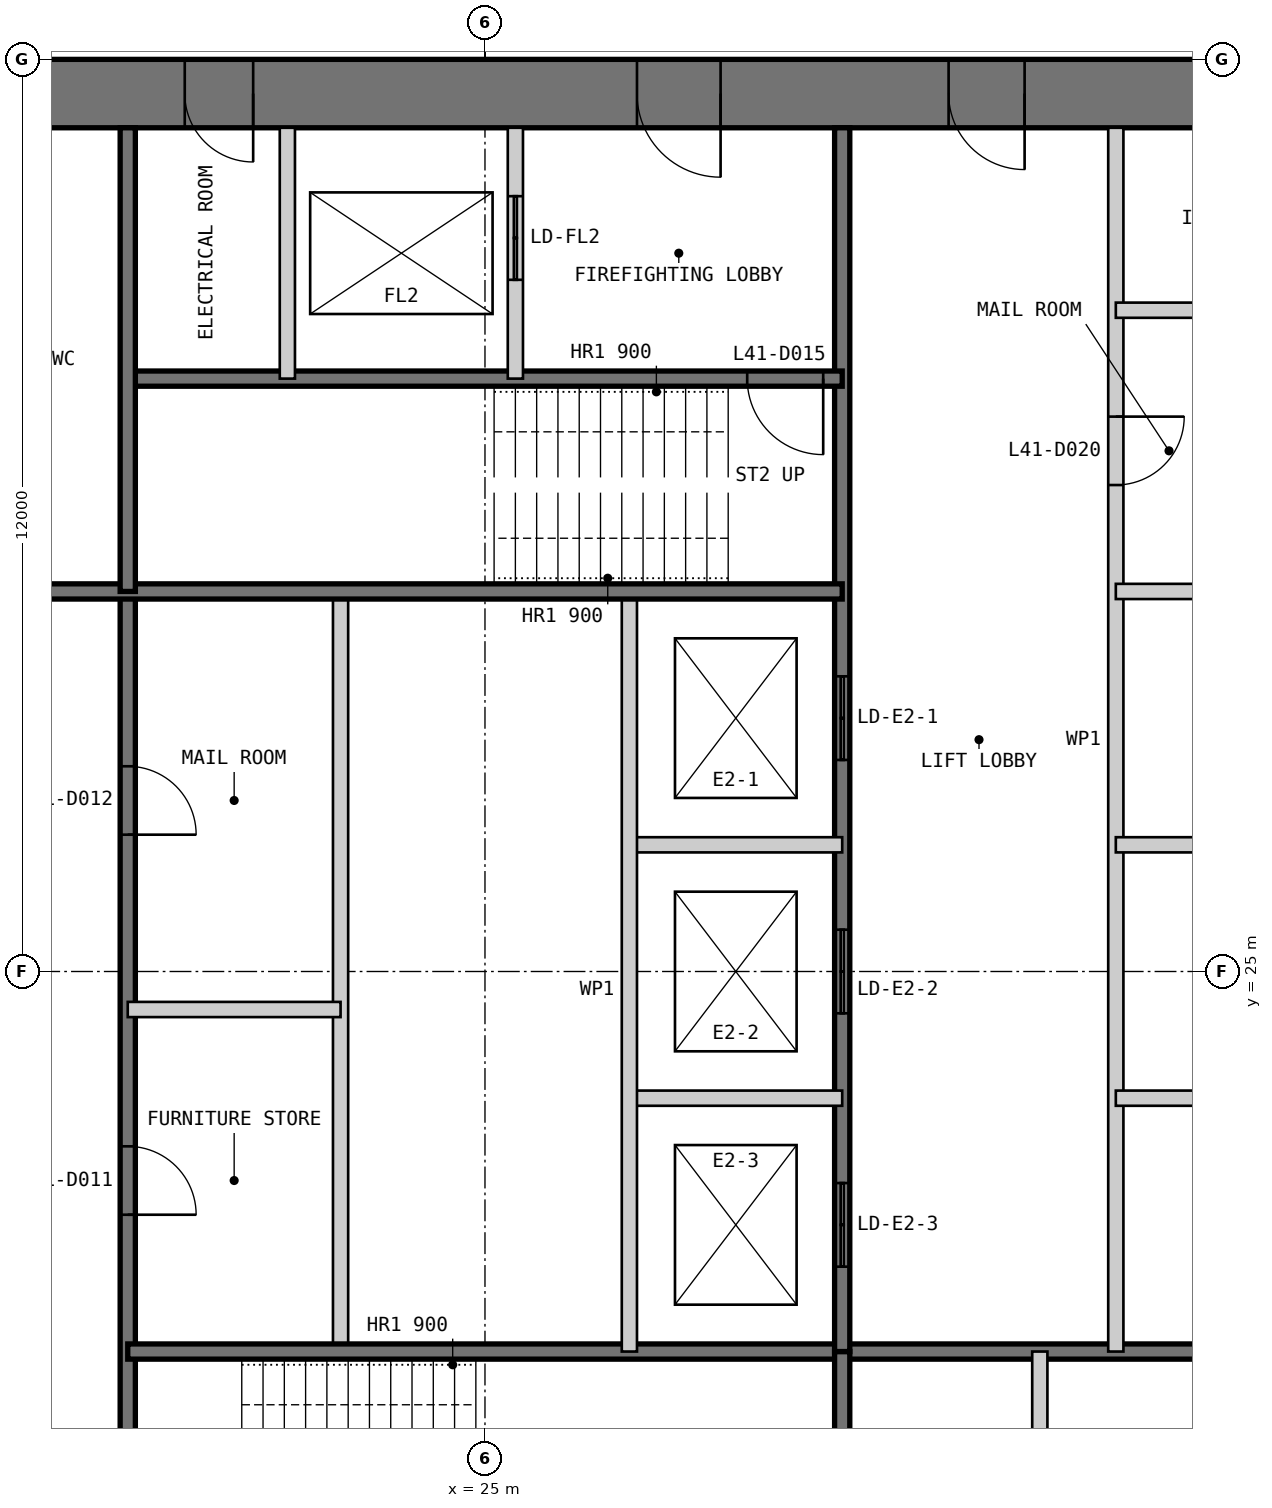
"""IFC4 building model, lengths in metres.
Left out: names, types, materials, properties, quantities, classifications, styles, units other than length and angle.
Written with IfcOpenShell. Run it as: python <this file> out.ifc"""

import sys

from ifc_helpers import new_model, si_unit, direction, frame, frame_2d, origin, place, context, subcontext, project, spatial, polyline, rectangle, outline, extrude, element, fill, save


model = new_model("IFC4")
c1 = context("Model", 3, precision=1e-05, world=origin(), true_north=direction((0.0, 1.0)))
c2 = subcontext(c1, "Body", "Model", "MODEL_VIEW")
j1 = project(units=[si_unit("LENGTHUNIT", "METRE"), si_unit("PLANEANGLEUNIT", "RADIAN")], contexts=[c1])
p1 = place(None, origin())
s1 = spatial("IfcSite", under=j1, at=p1, CompositionType="ELEMENT")
p2 = place(p1, origin())
s2 = spatial("IfcBuilding", under=s1, at=p2, CompositionType="ELEMENT")
p3 = place(p2, frame((0.0, 0.0, 177.8)))
s3 = spatial("IfcBuildingStorey", under=s2, at=p3, CompositionType="ELEMENT", Elevation=177.8)
p4 = place(p3, frame((37.0, 36.55, 0.0), z_axis=(0.0, 0.0, 1.0), x_axis=(-1.0, 0.0, 0.0)))
e1 = element("IfcWall", 1, at=p4, inside=s3, PredefinedType="SHEAR", context=c2, shape_type="SweptSolid", body=[
    extrude(outline(polyline([(0.0, -0.45), (24.0, -0.45), (23.1, 0.45), (0.9, 0.45), (0.0, -0.45)])), origin(), (0.0, 0.0, 1.0), 4.0),
])
p5 = place(p4, frame((4.9, 0.0, 0.0)))
e2 = element("IfcOpeningElement", 2, at=p5, cuts=e1, PredefinedType="OPENING", context=c2, shape_type="SweptSolid", body=[
    extrude(rectangle(XDim=1.0, YDim=2.2, at=frame_2d((0.5, 1.1))), frame((0.0, 0.46, 0.0), z_axis=(0.0, -1.0, 0.0), x_axis=(1.0, 0.0, 0.0)), (0.0, 0.0, 1.0), 0.92),
])
p6 = place(p4, frame((8.9, 0.0, 0.0)))
e3 = element("IfcOpeningElement", 3, at=p6, cuts=e1, PredefinedType="OPENING", context=c2, shape_type="SweptSolid", body=[
    extrude(rectangle(XDim=1.1, YDim=2.2, at=frame_2d((0.55, 1.1))), frame((0.0, 0.46, 0.0), z_axis=(0.0, -1.0, 0.0), x_axis=(1.0, 0.0, 0.0)), (0.0, 0.0, 1.0), 0.92),
])
p7 = place(p4, frame((15.05, 0.0, 0.0)))
e4 = element("IfcOpeningElement", 4, at=p7, cuts=e1, PredefinedType="OPENING", context=c2, shape_type="SweptSolid", body=[
    extrude(rectangle(XDim=0.9, YDim=2.2, at=frame_2d((0.45, 1.1))), frame((0.0, 0.46, 0.0), z_axis=(0.0, -1.0, 0.0), x_axis=(1.0, 0.0, 0.0)), (0.0, 0.0, 1.0), 0.92),
])
p8 = place(p4, frame((17.9, 0.0, 0.0)))
e5 = element("IfcOpeningElement", 5, at=p8, cuts=e1, PredefinedType="OPENING", context=c2, shape_type="SweptSolid", body=[
    extrude(rectangle(XDim=1.0, YDim=2.2, at=frame_2d((0.5, 1.1))), frame((0.0, 0.46, 0.0), z_axis=(0.0, -1.0, 0.0), x_axis=(1.0, 0.0, 0.0)), (0.0, 0.0, 1.0), 0.92),
])
p9 = place(p4, frame((21.4, 0.0, 0.0)))
e6 = element("IfcOpeningElement", 6, at=p9, cuts=e1, PredefinedType="OPENING", context=c2, shape_type="SweptSolid", body=[
    extrude(rectangle(XDim=1.0, YDim=2.2, at=frame_2d((0.5, 1.1))), frame((0.0, 0.46, 0.0), z_axis=(0.0, -1.0, 0.0), x_axis=(1.0, 0.0, 0.0)), (0.0, 0.0, 1.0), 0.92),
])
p10 = place(p3, frame((20.3, 13.9, 0.0), z_axis=(0.0, 0.0, 1.0), x_axis=(0.0, 1.0, 0.0)))
e7 = element("IfcWall", 7, at=p10, inside=s3, PredefinedType="SOLIDWALL", context=c2, shape_type="SweptSolid", body=[
    extrude(rectangle(XDim=16.1, YDim=0.2, at=frame_2d((8.05, 0.0))), origin(), (0.0, 0.0, 1.0), 3.8),
])
p11 = place(p10, frame((7.9, 0.0, 0.0)))
e8 = element("IfcOpeningElement", 8, at=p11, cuts=e7, PredefinedType="OPENING", context=c2, shape_type="SweptSolid", body=[
    extrude(rectangle(XDim=0.9, YDim=2.2, at=frame_2d((0.45, 1.1))), frame((0.0, 0.11, 0.0), z_axis=(0.0, -1.0, 0.0), x_axis=(1.0, 0.0, 0.0)), (0.0, 0.0, 1.0), 0.22),
])
p12 = place(p10, frame((12.9, 0.0, 0.0)))
e9 = element("IfcOpeningElement", 9, at=p12, cuts=e7, PredefinedType="OPENING", context=c2, shape_type="SweptSolid", body=[
    extrude(rectangle(XDim=0.9, YDim=2.2, at=frame_2d((0.45, 1.1))), frame((0.0, 0.11, 0.0), z_axis=(0.0, -1.0, 0.0), x_axis=(1.0, 0.0, 0.0)), (0.0, 0.0, 1.0), 0.22),
])
p13 = place(p3, frame((23.1, 20.0, 0.0), z_axis=(0.0, 0.0, 1.0), x_axis=(0.0, 1.0, 0.0)))
e10 = element("IfcWall", 10, at=p13, inside=s3, PredefinedType="PARTITIONING", context=c2, shape_type="SweptSolid", body=[
    extrude(rectangle(XDim=10.0, YDim=0.2, at=frame_2d((5.0, 0.0))), origin(), (0.0, 0.0, 1.0), 3.8),
])
p14 = place(p3, frame((20.3, 20.0, 0.0), z_axis=(0.0, 0.0, 1.0), x_axis=(1.0, 0.0, 0.0)))
e11 = element("IfcWall", 11, at=p14, inside=s3, PredefinedType="SOLIDWALL", context=c2, shape_type="SweptSolid", body=[
    extrude(rectangle(XDim=15.8, YDim=0.2, at=frame_2d((7.9, 0.0))), origin(), (0.0, 0.0, 1.0), 3.8),
])
p15 = place(p3, frame((29.7, 13.9, 0.0), z_axis=(0.0, 0.0, 1.0), x_axis=(0.0, 1.0, 0.0)))
e12 = element("IfcWall", 12, at=p15, inside=s3, PredefinedType="SOLIDWALL", context=c2, shape_type="SweptSolid", body=[
    extrude(rectangle(XDim=6.1, YDim=0.2, at=frame_2d((3.05, 0.0))), origin(), (0.0, 0.0, 1.0), 3.8),
])
p16 = place(p3, frame((32.3, 13.9, 0.0), z_axis=(0.0, 0.0, 1.0), x_axis=(0.0, 1.0, 0.0)))
e13 = element("IfcWall", 13, at=p16, inside=s3, PredefinedType="PARTITIONING", context=c2, shape_type="SweptSolid", body=[
    extrude(rectangle(XDim=6.1, YDim=0.2, at=frame_2d((3.05, 0.0))), origin(), (0.0, 0.0, 1.0), 3.8),
])
p17 = place(p3, frame((20.3, 24.5, 0.0), z_axis=(0.0, 0.0, 1.0), x_axis=(1.0, 0.0, 0.0)))
e14 = element("IfcWall", 14, at=p17, inside=s3, PredefinedType="PARTITIONING", context=c2, shape_type="SweptSolid", body=[
    extrude(rectangle(XDim=2.8, YDim=0.2, at=frame_2d((1.4, 0.0))), origin(), (0.0, 0.0, 1.0), 3.8),
])
p18 = place(p3, frame((33.3, 36.1, 0.0), z_axis=(0.0, 0.0, 1.0), x_axis=(0.0, -1.0, 0.0)))
e15 = element("IfcWall", 15, at=p18, inside=s3, PredefinedType="PARTITIONING", context=c2, shape_type="SweptSolid", body=[
    extrude(rectangle(XDim=16.1, YDim=0.2, at=frame_2d((8.05, 0.0))), origin(), (0.0, 0.0, 1.0), 3.8),
])
p19 = place(p18, frame((3.8, 0.0, 0.0)))
e16 = element("IfcOpeningElement", 16, at=p19, cuts=e15, PredefinedType="OPENING", context=c2, shape_type="SweptSolid", body=[
    extrude(rectangle(XDim=0.9, YDim=2.2, at=frame_2d((0.45, 1.1))), frame((0.0, 0.11, 0.0), z_axis=(0.0, -1.0, 0.0), x_axis=(1.0, 0.0, 0.0)), (0.0, 0.0, 1.0), 0.22),
])
p20 = place(p3, frame((29.7, 36.1, 0.0), z_axis=(0.0, 0.0, 1.0), x_axis=(0.0, -1.0, 0.0)))
e17 = element("IfcWall", 17, at=p20, inside=s3, PredefinedType="SOLIDWALL", context=c2, shape_type="SweptSolid", body=[
    extrude(rectangle(XDim=16.1, YDim=0.2, at=frame_2d((8.05, 0.0))), origin(), (0.0, 0.0, 1.0), 3.8),
])
p21 = place(p20, frame((7.217, 0.0, 0.0)))
e18 = element("IfcOpeningElement", 18, at=p21, cuts=e17, PredefinedType="OPENING", context=c2, shape_type="SweptSolid", body=[
    extrude(rectangle(XDim=1.1, YDim=2.2, at=frame_2d((0.55, 1.1))), frame((0.0, 0.11, 0.0), z_axis=(0.0, -1.0, 0.0), x_axis=(1.0, 0.0, 0.0)), (0.0, 0.0, 1.0), 0.22),
])
p22 = place(p20, frame((10.55, 0.0, 0.0)))
e19 = element("IfcOpeningElement", 19, at=p22, cuts=e17, PredefinedType="OPENING", context=c2, shape_type="SweptSolid", body=[
    extrude(rectangle(XDim=1.1, YDim=2.2, at=frame_2d((0.55, 1.1))), frame((0.0, 0.11, 0.0), z_axis=(0.0, -1.0, 0.0), x_axis=(1.0, 0.0, 0.0)), (0.0, 0.0, 1.0), 0.22),
])
p23 = place(p20, frame((13.883, 0.0, 0.0)))
e20 = element("IfcOpeningElement", 20, at=p23, cuts=e17, PredefinedType="OPENING", context=c2, shape_type="SweptSolid", body=[
    extrude(rectangle(XDim=1.1, YDim=2.2, at=frame_2d((0.55, 1.1))), frame((0.0, 0.11, 0.0), z_axis=(0.0, -1.0, 0.0), x_axis=(1.0, 0.0, 0.0)), (0.0, 0.0, 1.0), 0.22),
])
for number, where, z_axis, x_axis in (
    (21, (36.1, 30.0, 0.0), (0.0, 0.0, 1.0), (-1.0, 0.0, 0.0)),
    (22, (36.1, 26.667, 0.0), (0.0, 0.0, 1.0), (-1.0, 0.0, 0.0)),
    (23, (36.1, 23.333, 0.0), (0.0, 0.0, 1.0), (-1.0, 0.0, 0.0)),
    (24, (29.7, 26.667, 0.0), (0.0, 0.0, 1.0), (-1.0, 0.0, 0.0)),
    (25, (29.7, 23.333, 0.0), (0.0, 0.0, 1.0), (-1.0, 0.0, 0.0)),
):
    element("IfcWall", number, at=place(p3, frame(where, z_axis=z_axis, x_axis=x_axis)), inside=s3, PredefinedType="PARTITIONING", context=c2, shape_type="SweptSolid", body=[
        extrude(rectangle(XDim=2.8, YDim=0.2, at=frame_2d((1.4, 0.0))), origin(), (0.0, 0.0, 1.0), 3.8),
    ])
p24 = place(p3, frame((26.9, 30.0, 0.0), z_axis=(0.0, 0.0, 1.0), x_axis=(0.0, -1.0, 0.0)))
e26 = element("IfcWall", 26, at=p24, inside=s3, PredefinedType="PARTITIONING", context=c2, shape_type="SweptSolid", body=[
    extrude(rectangle(XDim=10.0, YDim=0.2, at=frame_2d((5.0, 0.0))), origin(), (0.0, 0.0, 1.0), 3.8),
])
p25 = place(p3, frame((29.7, 32.8, 0.0), z_axis=(0.0, 0.0, 1.0), x_axis=(-1.0, 0.0, 0.0)))
e27 = element("IfcWall", 27, at=p25, inside=s3, PredefinedType="SOLIDWALL", context=c2, shape_type="SweptSolid", body=[
    extrude(rectangle(XDim=9.4, YDim=0.2, at=frame_2d((4.7, 0.0))), origin(), (0.0, 0.0, 1.0), 3.8),
])
p26 = place(p25, frame((0.25, 0.0, 0.0)))
e28 = element("IfcOpeningElement", 28, at=p26, cuts=e27, PredefinedType="OPENING", context=c2, shape_type="SweptSolid", body=[
    extrude(rectangle(XDim=1.0, YDim=2.2, at=frame_2d((0.5, 1.1))), frame((0.0, 0.11, 0.0), z_axis=(0.0, -1.0, 0.0), x_axis=(1.0, 0.0, 0.0)), (0.0, 0.0, 1.0), 0.22),
])
p27 = place(p3, frame((29.7, 30.0, 0.0), z_axis=(0.0, 0.0, 1.0), x_axis=(-1.0, 0.0, 0.0)))
e29 = element("IfcWall", 29, at=p27, inside=s3, PredefinedType="SOLIDWALL", context=c2, shape_type="SweptSolid", body=[
    extrude(rectangle(XDim=15.8, YDim=0.2, at=frame_2d((7.9, 0.0))), origin(), (0.0, 0.0, 1.0), 3.8),
])
p28 = place(p3, frame((25.4, 36.1, 0.0), z_axis=(0.0, 0.0, 1.0), x_axis=(0.0, -1.0, 0.0)))
e30 = element("IfcWall", 30, at=p28, inside=s3, PredefinedType="PARTITIONING", context=c2, shape_type="SweptSolid", body=[
    extrude(rectangle(XDim=3.3, YDim=0.2, at=frame_2d((1.65, 0.0))), origin(), (0.0, 0.0, 1.0), 3.8),
])
p29 = place(p28, frame((0.9, 0.0, 0.0)))
e31 = element("IfcOpeningElement", 31, at=p29, cuts=e30, PredefinedType="OPENING", context=c2, shape_type="SweptSolid", body=[
    extrude(rectangle(XDim=1.1, YDim=2.2, at=frame_2d((0.55, 1.1))), frame((0.0, 0.11, 0.0), z_axis=(0.0, -1.0, 0.0), x_axis=(1.0, 0.0, 0.0)), (0.0, 0.0, 1.0), 0.22),
])
p30 = place(p3, frame((22.4, 36.1, 0.0), z_axis=(0.0, 0.0, 1.0), x_axis=(0.0, -1.0, 0.0)))
e32 = element("IfcWall", 32, at=p30, inside=s3, PredefinedType="PARTITIONING", context=c2, shape_type="SweptSolid", body=[
    extrude(rectangle(XDim=3.3, YDim=0.2, at=frame_2d((1.65, 0.0))), origin(), (0.0, 0.0, 1.0), 3.8),
])
p31 = place(p3, frame((20.3, 36.1, 0.0), z_axis=(0.0, 0.0, 1.0), x_axis=(0.0, -1.0, 0.0)))
e33 = element("IfcWall", 33, at=p31, inside=s3, PredefinedType="SOLIDWALL", context=c2, shape_type="SweptSolid", body=[
    extrude(rectangle(XDim=6.1, YDim=0.2, at=frame_2d((3.05, 0.0))), origin(), (0.0, 0.0, 1.0), 3.8),
])
p32 = place(p3, frame((36.1, 33.7, 0.0), z_axis=(0.0, 0.0, 1.0), x_axis=(-1.0, 0.0, 0.0)))
e34 = element("IfcWall", 34, at=p32, inside=s3, PredefinedType="PARTITIONING", context=c2, shape_type="SweptSolid", body=[
    extrude(rectangle(XDim=2.8, YDim=0.2, at=frame_2d((1.4, 0.0))), origin(), (0.0, 0.0, 1.0), 3.8),
])
p33 = place(p11, frame((0.9, 0.0, 0.0), z_axis=(0.0, 0.0, 1.0), x_axis=(-1.0, 0.0, 0.0)))
e35 = element("IfcDoor", 35, at=p33, inside=s3, OperationType="SINGLE_SWING_RIGHT", PredefinedType="DOOR", context=c2, shape_type="SweptSolid", body=[
    extrude(rectangle(XDim=0.9, YDim=2.2, at=frame_2d((0.45, 1.1))), frame((0.0, 0.025, 0.0), z_axis=(0.0, -1.0, 0.0), x_axis=(1.0, 0.0, 0.0)), (0.0, 0.0, 1.0), 0.05),
])
fill(e8, e35)
p34 = place(p12, frame((0.9, 0.0, 0.0), z_axis=(0.0, 0.0, 1.0), x_axis=(-1.0, 0.0, 0.0)))
e36 = element("IfcDoor", 36, at=p34, inside=s3, OperationType="SINGLE_SWING_RIGHT", PredefinedType="DOOR", context=c2, shape_type="SweptSolid", body=[
    extrude(rectangle(XDim=0.9, YDim=2.2, at=frame_2d((0.45, 1.1))), frame((0.0, 0.025, 0.0), z_axis=(0.0, -1.0, 0.0), x_axis=(1.0, 0.0, 0.0)), (0.0, 0.0, 1.0), 0.05),
])
fill(e9, e36)
p35 = place(p5, origin())
e37 = element("IfcDoor", 37, at=p35, inside=s3, OperationType="SINGLE_SWING_LEFT", PredefinedType="DOOR", context=c2, shape_type="SweptSolid", body=[
    extrude(rectangle(XDim=1.0, YDim=2.2, at=frame_2d((0.5, 1.1))), frame((0.0, 0.025, 0.0), z_axis=(0.0, -1.0, 0.0), x_axis=(1.0, 0.0, 0.0)), (0.0, 0.0, 1.0), 0.05),
    extrude(outline(polyline([(0.0, 0.0), (0.04, 0.0), (0.04, 2.16), (0.96, 2.16), (0.96, 0.0), (1.0, 0.0), (1.0, 2.2), (0.0, 2.2), (0.0, 0.0)])), frame((0.0, 0.3, 0.0), z_axis=(0.0, -1.0, 0.0), x_axis=(1.0, 0.0, 0.0)), (0.0, 0.0, 1.0), 0.6),
])
fill(e2, e37)
p36 = place(p6, origin())
e38 = element("IfcDoor", 38, at=p36, inside=s3, OperationType="SINGLE_SWING_LEFT", PredefinedType="DOOR", context=c2, shape_type="SweptSolid", body=[
    extrude(rectangle(XDim=1.1, YDim=2.2, at=frame_2d((0.55, 1.1))), frame((0.0, 0.025, 0.0), z_axis=(0.0, -1.0, 0.0), x_axis=(1.0, 0.0, 0.0)), (0.0, 0.0, 1.0), 0.05),
    extrude(outline(polyline([(0.0, 0.0), (0.04, 0.0), (0.04, 2.16), (1.06, 2.16), (1.06, 0.0), (1.1, 0.0), (1.1, 2.2), (0.0, 2.2), (0.0, 0.0)])), frame((0.0, 0.3, 0.0), z_axis=(0.0, -1.0, 0.0), x_axis=(1.0, 0.0, 0.0)), (0.0, 0.0, 1.0), 0.6),
])
fill(e3, e38)
p37 = place(p26, origin())
e39 = element("IfcDoor", 39, at=p37, inside=s3, OperationType="SINGLE_SWING_LEFT", PredefinedType="DOOR", context=c2, shape_type="SweptSolid", body=[
    extrude(rectangle(XDim=1.0, YDim=2.2, at=frame_2d((0.5, 1.1))), frame((0.0, 0.025, 0.0), z_axis=(0.0, -1.0, 0.0), x_axis=(1.0, 0.0, 0.0)), (0.0, 0.0, 1.0), 0.05),
])
fill(e28, e39)
p38 = place(p7, origin())
e40 = element("IfcDoor", 40, at=p38, inside=s3, OperationType="SINGLE_SWING_LEFT", PredefinedType="DOOR", context=c2, shape_type="SweptSolid", body=[
    extrude(rectangle(XDim=0.9, YDim=2.2, at=frame_2d((0.45, 1.1))), frame((0.0, 0.025, 0.0), z_axis=(0.0, -1.0, 0.0), x_axis=(1.0, 0.0, 0.0)), (0.0, 0.0, 1.0), 0.05),
    extrude(outline(polyline([(0.0, 0.0), (0.04, 0.0), (0.04, 2.16), (0.86, 2.16), (0.86, 0.0), (0.9, 0.0), (0.9, 2.2), (0.0, 2.2), (0.0, 0.0)])), frame((0.0, 0.3, 0.0), z_axis=(0.0, -1.0, 0.0), x_axis=(1.0, 0.0, 0.0)), (0.0, 0.0, 1.0), 0.6),
])
fill(e4, e40)
p39 = place(p19, origin())
e41 = element("IfcDoor", 41, at=p39, inside=s3, OperationType="SINGLE_SWING_LEFT", PredefinedType="DOOR", context=c2, shape_type="SweptSolid", body=[
    extrude(rectangle(XDim=0.9, YDim=2.2, at=frame_2d((0.45, 1.1))), frame((0.0, 0.025, 0.0), z_axis=(0.0, -1.0, 0.0), x_axis=(1.0, 0.0, 0.0)), (0.0, 0.0, 1.0), 0.05),
])
fill(e16, e41)
p40 = place(p29, origin())
e42 = element("IfcDoor", 42, at=p40, inside=s3, OperationType="DOUBLE_DOOR_SLIDING", PredefinedType="DOOR", context=c2, shape_type="SweptSolid", body=[
    extrude(rectangle(XDim=1.1, YDim=2.2, at=frame_2d((0.55, 1.1))), frame((0.0, 0.025, 0.0), z_axis=(0.0, -1.0, 0.0), x_axis=(1.0, 0.0, 0.0)), (0.0, 0.0, 1.0), 0.05),
])
fill(e31, e42)
p41 = place(p21, origin())
e43 = element("IfcDoor", 43, at=p41, inside=s3, OperationType="DOUBLE_DOOR_SLIDING", PredefinedType="DOOR", context=c2, shape_type="SweptSolid", body=[
    extrude(rectangle(XDim=1.1, YDim=2.2, at=frame_2d((0.55, 1.1))), frame((0.0, 0.025, 0.0), z_axis=(0.0, -1.0, 0.0), x_axis=(1.0, 0.0, 0.0)), (0.0, 0.0, 1.0), 0.05),
])
fill(e18, e43)
p42 = place(p22, origin())
e44 = element("IfcDoor", 44, at=p42, inside=s3, OperationType="DOUBLE_DOOR_SLIDING", PredefinedType="DOOR", context=c2, shape_type="SweptSolid", body=[
    extrude(rectangle(XDim=1.1, YDim=2.2, at=frame_2d((0.55, 1.1))), frame((0.0, 0.025, 0.0), z_axis=(0.0, -1.0, 0.0), x_axis=(1.0, 0.0, 0.0)), (0.0, 0.0, 1.0), 0.05),
])
fill(e19, e44)
p43 = place(p23, origin())
e45 = element("IfcDoor", 45, at=p43, inside=s3, OperationType="DOUBLE_DOOR_SLIDING", PredefinedType="DOOR", context=c2, shape_type="SweptSolid", body=[
    extrude(rectangle(XDim=1.1, YDim=2.2, at=frame_2d((0.55, 1.1))), frame((0.0, 0.025, 0.0), z_axis=(0.0, -1.0, 0.0), x_axis=(1.0, 0.0, 0.0)), (0.0, 0.0, 1.0), 0.05),
])
fill(e20, e45)
save(model, sys.argv[1])
